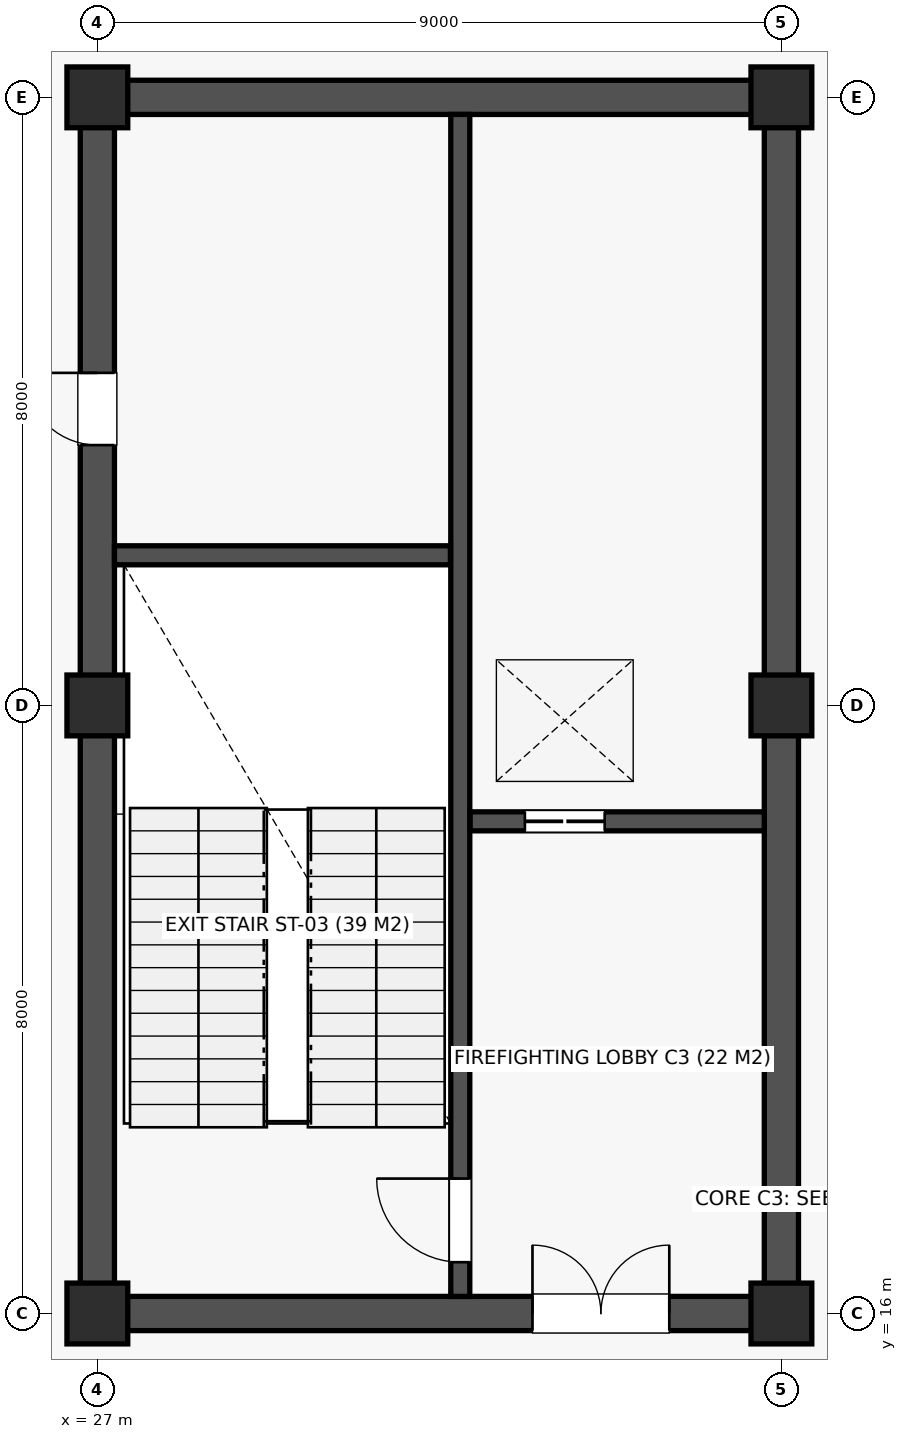
"""IFC4 building model, lengths in metres.
Left out: names, types, materials, properties, quantities, classifications, styles, units other than length and angle.
Written with IfcOpenShell. Run it as: python <this file> out.ifc"""

import sys

from ifc_helpers import new_model, si_unit, direction, frame, frame_2d, origin, origin_2d, place, context, subcontext, project, spatial, rectangle, extrude, element, fill, save


model = new_model("IFC4")
c1 = context("Model", 3, precision=1e-05, world=origin(), true_north=direction((0.0, 1.0)))
c2 = subcontext(c1, "Body", "Model", "MODEL_VIEW")
j1 = project(units=[si_unit("LENGTHUNIT", "METRE"), si_unit("PLANEANGLEUNIT", "RADIAN")], contexts=[c1])
p1 = place(None, origin())
s1 = spatial("IfcSite", under=j1, at=p1, CompositionType="ELEMENT")
p2 = place(p1, origin())
s2 = spatial("IfcBuilding", under=s1, at=p2, CompositionType="ELEMENT")
p3 = place(p2, frame((0.0, 0.0, 4.5)))
s3 = spatial("IfcBuildingStorey", under=s2, at=p3, CompositionType="ELEMENT", Elevation=4.5)
for number, where, z_axis, x_axis in (
    (1, (27.0, 16.0, 0.0), (0.0, 0.0, 1.0), (1.0, 0.0, 0.0)),
    (2, (27.0, 24.0, 0.0), (0.0, 0.0, 1.0), (1.0, 0.0, 0.0)),
    (3, (27.0, 32.0, 0.0), (0.0, 0.0, 1.0), (1.0, 0.0, 0.0)),
    (4, (36.0, 16.0, 0.0), (0.0, 0.0, 1.0), (1.0, 0.0, 0.0)),
    (5, (36.0, 24.0, 0.0), (0.0, 0.0, 1.0), (1.0, 0.0, 0.0)),
    (6, (36.0, 32.0, 0.0), (0.0, 0.0, 1.0), (1.0, 0.0, 0.0)),
):
    element("IfcColumn", number, at=place(p3, frame(where, z_axis=z_axis, x_axis=x_axis)), inside=s3, PredefinedType="COLUMN", context=c2, shape_type="SweptSolid", body=[
        extrude(rectangle(XDim=0.8, YDim=0.8, at=origin_2d()), origin(), (0.0, 0.0, 1.0), 4.5),
    ])
p4 = place(p3, frame((27.225, 16.0, 0.0), z_axis=(0.0, 0.0, 1.0), x_axis=(1.0, 0.0, 0.0)))
e7 = element("IfcWall", 7, at=p4, inside=s3, PredefinedType="SHEAR", context=c2, shape_type="SweptSolid", body=[
    extrude(rectangle(XDim=8.55, YDim=0.45, at=frame_2d((4.275, 0.0))), origin(), (0.0, 0.0, 1.0), 4.18),
])
p5 = place(p4, frame((5.5, 0.0, 0.0)))
e8 = element("IfcOpeningElement", 8, at=p5, cuts=e7, PredefinedType="OPENING", context=c2, shape_type="SweptSolid", body=[
    extrude(rectangle(XDim=1.8, YDim=2.18, at=frame_2d((0.9, 1.09))), frame((0.0, 0.237, 0.0), z_axis=(0.0, -1.0, 0.0), x_axis=(1.0, 0.0, 0.0)), (0.0, 0.0, 1.0), 0.474),
])
p6 = place(p3, frame((27.225, 32.0, 0.0), z_axis=(0.0, 0.0, 1.0), x_axis=(1.0, 0.0, 0.0)))
e9 = element("IfcWall", 9, at=p6, inside=s3, PredefinedType="SHEAR", context=c2, shape_type="SweptSolid", body=[
    extrude(rectangle(XDim=8.55, YDim=0.45, at=frame_2d((4.275, 0.0))), origin(), (0.0, 0.0, 1.0), 4.18),
])
p7 = place(p3, frame((27.0, 16.225, 0.0), z_axis=(0.0, 0.0, 1.0), x_axis=(0.0, 1.0, 0.0)))
e10 = element("IfcWall", 10, at=p7, inside=s3, PredefinedType="SHEAR", context=c2, shape_type="SweptSolid", body=[
    extrude(rectangle(XDim=15.55, YDim=0.45, at=frame_2d((7.775, 0.0))), origin(), (0.0, 0.0, 1.0), 4.18),
])
p8 = place(p7, frame((11.2, 0.0, 0.0)))
e11 = element("IfcOpeningElement", 11, at=p8, cuts=e10, PredefinedType="OPENING", context=c2, shape_type="SweptSolid", body=[
    extrude(rectangle(XDim=0.95, YDim=2.1, at=frame_2d((0.475, 1.05))), frame((0.0, 0.237, 0.0), z_axis=(0.0, -1.0, 0.0), x_axis=(1.0, 0.0, 0.0)), (0.0, 0.0, 1.0), 0.474),
])
p9 = place(p3, frame((36.0, 16.225, 0.0), z_axis=(0.0, 0.0, 1.0), x_axis=(0.0, 1.0, 0.0)))
e12 = element("IfcWall", 12, at=p9, inside=s3, PredefinedType="SHEAR", context=c2, shape_type="SweptSolid", body=[
    extrude(rectangle(XDim=15.55, YDim=0.45, at=frame_2d((7.775, 0.0))), origin(), (0.0, 0.0, 1.0), 4.18),
])
p10 = place(p3, frame((31.775, 16.225, 0.0), z_axis=(0.0, 0.0, 1.0), x_axis=(0.0, 1.0, 0.0)))
e13 = element("IfcWall", 13, at=p10, inside=s3, PredefinedType="SOLIDWALL", context=c2, shape_type="SweptSolid", body=[
    extrude(rectangle(XDim=15.55, YDim=0.25, at=frame_2d((7.775, 0.0))), origin(), (0.0, 0.0, 1.0), 4.18),
])
p11 = place(p10, frame((0.45, 0.0, 0.0)))
e14 = element("IfcOpeningElement", 14, at=p11, cuts=e13, PredefinedType="OPENING", context=c2, shape_type="SweptSolid", body=[
    extrude(rectangle(XDim=1.1, YDim=2.15, at=frame_2d((0.55, 1.075))), frame((0.0, 0.137, 0.0), z_axis=(0.0, -1.0, 0.0), x_axis=(1.0, 0.0, 0.0)), (0.0, 0.0, 1.0), 0.274),
])
p12 = place(p3, frame((27.225, 25.975, 0.0), z_axis=(0.0, 0.0, 1.0), x_axis=(1.0, 0.0, 0.0)))
e15 = element("IfcWall", 15, at=p12, inside=s3, PredefinedType="SOLIDWALL", context=c2, shape_type="SweptSolid", body=[
    extrude(rectangle(XDim=4.42, YDim=0.25, at=frame_2d((2.21, 0.0))), origin(), (0.0, 0.0, 1.0), 4.18),
])
p13 = place(p3, frame((31.905, 22.475, 0.0), z_axis=(0.0, 0.0, 1.0), x_axis=(1.0, 0.0, 0.0)))
e16 = element("IfcWall", 16, at=p13, inside=s3, PredefinedType="SOLIDWALL", context=c2, shape_type="SweptSolid", body=[
    extrude(rectangle(XDim=3.87, YDim=0.25, at=frame_2d((1.935, 0.0))), origin(), (0.0, 0.0, 1.0), 4.18),
])
p14 = place(p13, frame((0.72, 0.0, 0.0)))
e17 = element("IfcOpeningElement", 17, at=p14, cuts=e16, PredefinedType="OPENING", context=c2, shape_type="SweptSolid", body=[
    extrude(rectangle(XDim=1.05, YDim=2.12, at=frame_2d((0.525, 1.06))), frame((0.0, 0.137, 0.0), z_axis=(0.0, -1.0, 0.0), x_axis=(1.0, 0.0, 0.0)), (0.0, 0.0, 1.0), 0.274),
])
p15 = place(p5, origin())
e18 = element("IfcDoor", 18, at=p15, inside=s3, OperationType="DOUBLE_DOOR_SINGLE_SWING", PredefinedType="DOOR", context=c2, shape_type="SweptSolid", body=[
    extrude(rectangle(XDim=1.8, YDim=2.18, at=frame_2d((0.9, 1.09))), frame((0.0, 0.025, 0.0), z_axis=(0.0, -1.0, 0.0), x_axis=(1.0, 0.0, 0.0)), (0.0, 0.0, 1.0), 0.05),
])
fill(e8, e18)
p16 = place(p11, origin())
e19 = element("IfcDoor", 19, at=p16, inside=s3, OperationType="SINGLE_SWING_RIGHT", PredefinedType="DOOR", context=c2, shape_type="SweptSolid", body=[
    extrude(rectangle(XDim=1.1, YDim=2.15, at=frame_2d((0.55, 1.075))), frame((0.0, 0.025, 0.0), z_axis=(0.0, -1.0, 0.0), x_axis=(1.0, 0.0, 0.0)), (0.0, 0.0, 1.0), 0.05),
])
fill(e14, e19)
p17 = place(p8, origin())
e20 = element("IfcDoor", 20, at=p17, inside=s3, OperationType="SINGLE_SWING_RIGHT", PredefinedType="DOOR", context=c2, shape_type="SweptSolid", body=[
    extrude(rectangle(XDim=0.95, YDim=2.1, at=frame_2d((0.475, 1.05))), frame((0.0, 0.025, 0.0), z_axis=(0.0, -1.0, 0.0), x_axis=(1.0, 0.0, 0.0)), (0.0, 0.0, 1.0), 0.05),
])
fill(e11, e20)
p18 = place(p14, origin())
e21 = element("IfcDoor", 21, at=p18, inside=s3, OperationType="DOUBLE_DOOR_SLIDING", PredefinedType="DOOR", context=c2, shape_type="SweptSolid", body=[
    extrude(rectangle(XDim=1.05, YDim=2.12, at=frame_2d((0.525, 1.06))), frame((0.0, 0.025, 0.0), z_axis=(0.0, -1.0, 0.0), x_axis=(1.0, 0.0, 0.0)), (0.0, 0.0, 1.0), 0.05),
])
fill(e17, e21)
save(model, sys.argv[1])
